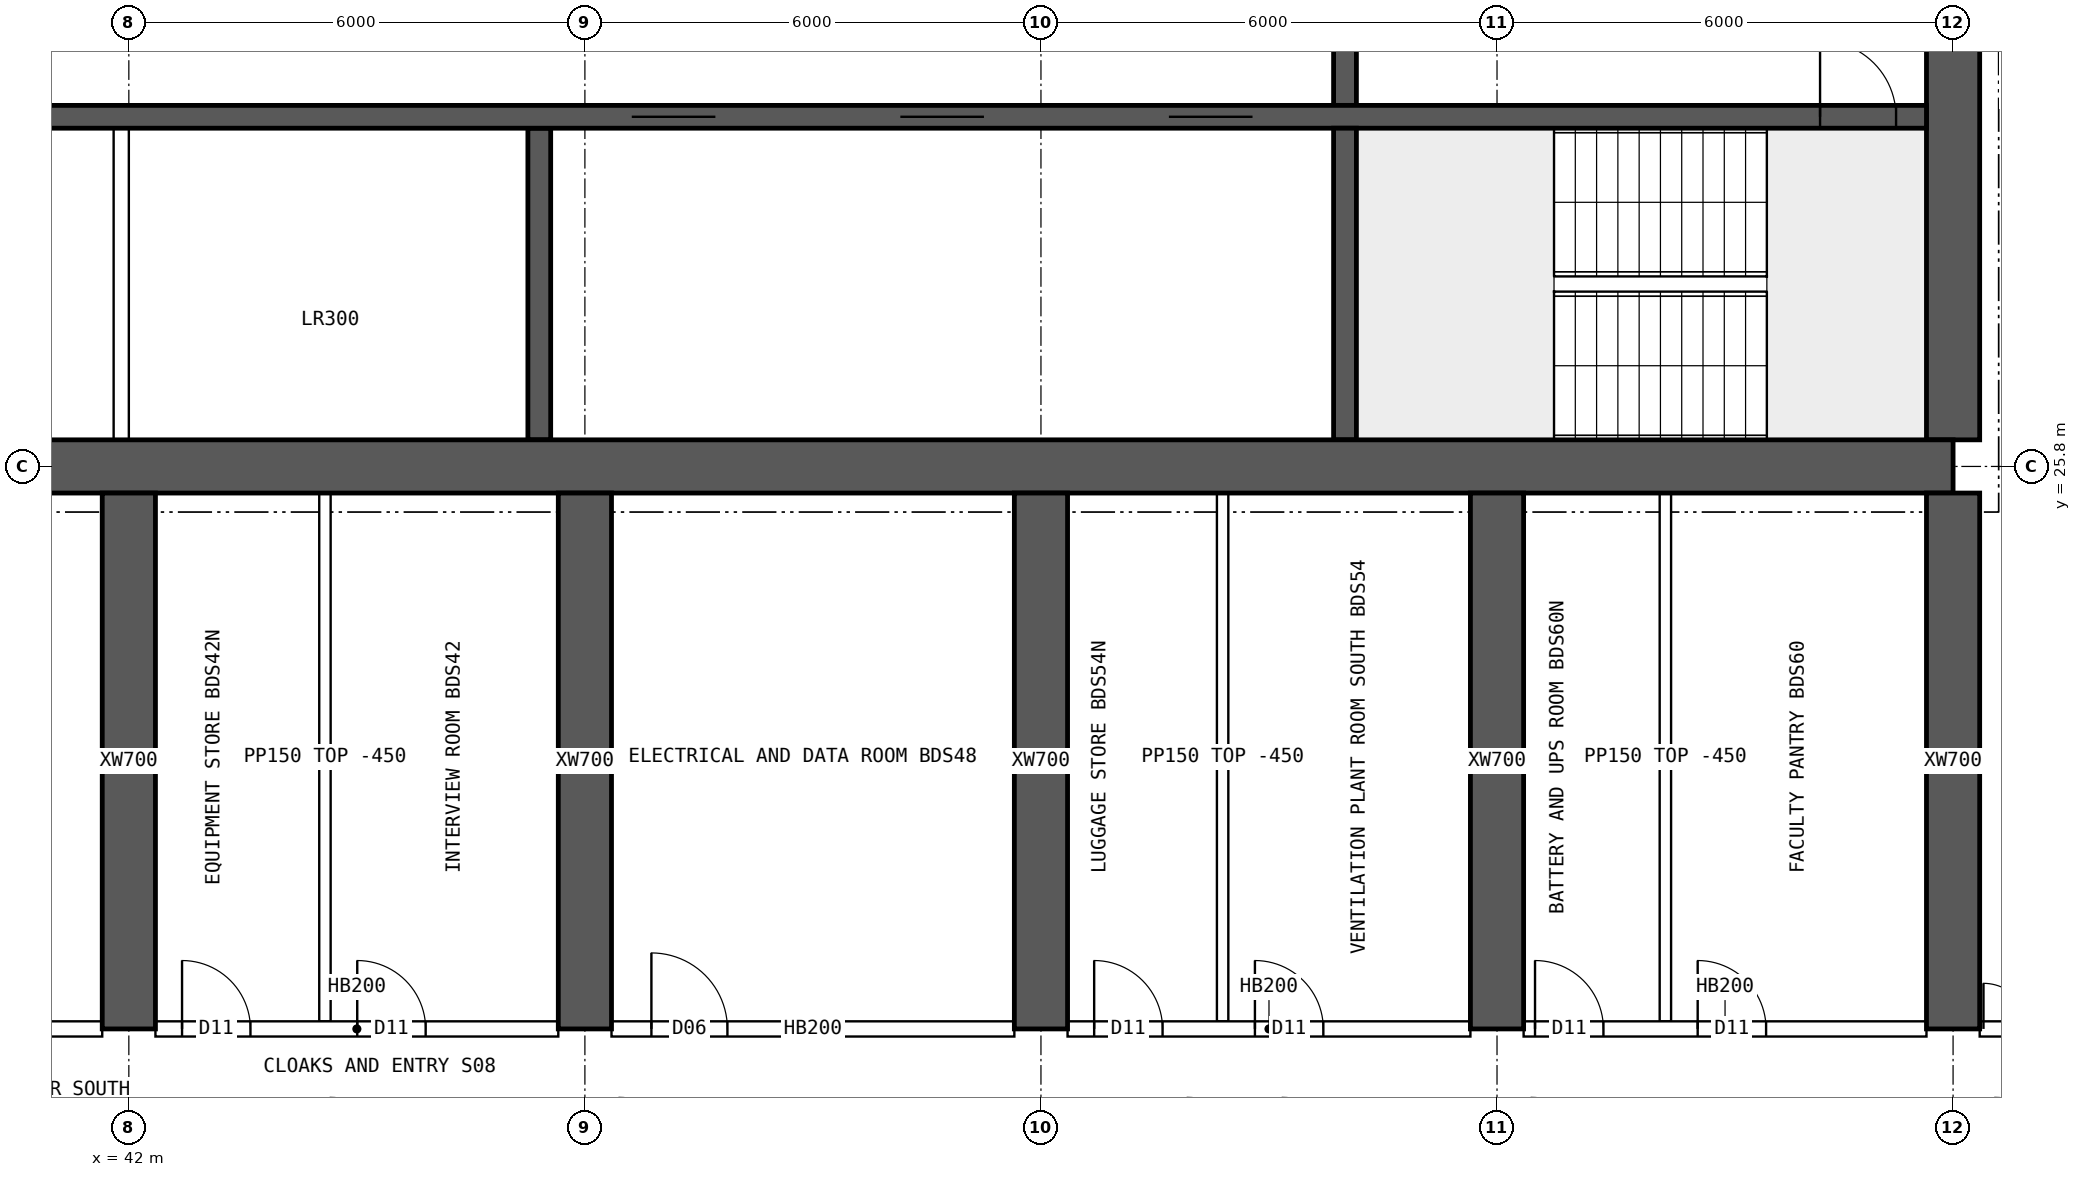
"""IFC4 building model, lengths in metres.
Left out: names, types, materials, properties, quantities, classifications, styles, units other than length and angle.
Written with IfcOpenShell. Run it as: python <this file> out.ifc"""

import sys

from ifc_helpers import new_model, si_unit, direction, frame, frame_2d, origin, place, context, subcontext, project, spatial, rectangle, extrude, element, fill, save


model = new_model("IFC4")
c1 = context("Model", 3, precision=1e-05, world=origin(), true_north=direction((0.0, 1.0)))
c2 = subcontext(c1, "Body", "Model", "MODEL_VIEW")
j1 = project(units=[si_unit("LENGTHUNIT", "METRE"), si_unit("PLANEANGLEUNIT", "RADIAN")], contexts=[c1])
p1 = place(None, origin())
s1 = spatial("IfcSite", under=j1, at=p1, CompositionType="ELEMENT")
p2 = place(p1, origin())
s2 = spatial("IfcBuilding", under=s1, at=p2, CompositionType="ELEMENT")
p3 = place(p2, frame((0.0, 0.0, 212.8)))
s3 = spatial("IfcBuildingStorey", under=s2, at=p3, CompositionType="ELEMENT", Elevation=212.8)
p4 = place(p3, frame((18.0, 25.8, 0.0), z_axis=(0.0, 0.0, 1.0), x_axis=(1.0, 0.0, 0.0)))
e1 = element("IfcWall", 1, at=p4, inside=s3, PredefinedType="SHEAR", context=c2, shape_type="SweptSolid", body=[
    extrude(rectangle(XDim=48.0, YDim=0.7, at=frame_2d((24.0, 0.0))), origin(), (0.0, 0.0, 1.0), 3.75),
])
p5 = place(p3, frame((66.0, 26.15, 0.0), z_axis=(0.0, 0.0, 1.0), x_axis=(0.0, 1.0, 0.0)))
e2 = element("IfcWall", 2, at=p5, inside=s3, PredefinedType="SHEAR", context=c2, shape_type="SweptSolid", body=[
    extrude(rectangle(XDim=11.7, YDim=0.7, at=frame_2d((5.85, 0.0))), origin(), (0.0, 0.0, 1.0), 3.75),
])
p6 = place(p5, frame((5.15, 0.0, 0.0)))
e3 = element("IfcOpeningElement", 3, at=p6, cuts=e2, PredefinedType="OPENING", context=c2, shape_type="SweptSolid", body=[
    extrude(rectangle(XDim=1.2, YDim=2.1, at=frame_2d((0.6, 1.05))), frame((0.0, 0.36, 0.0), z_axis=(0.0, -1.0, 0.0), x_axis=(1.0, 0.0, 0.0)), (0.0, 0.0, 1.0), 0.72),
])
p7 = place(p3, frame((18.35, 30.4, 0.0), z_axis=(0.0, 0.0, 1.0), x_axis=(1.0, 0.0, 0.0)))
e4 = element("IfcWall", 4, at=p7, inside=s3, PredefinedType="SHEAR", context=c2, shape_type="SweptSolid", body=[
    extrude(rectangle(XDim=47.3, YDim=0.3, at=frame_2d((23.65, 0.0))), origin(), (0.0, 0.0, 1.0), 3.75),
])
p8 = place(p7, frame((0.4, 0.0, 0.0)))
e5 = element("IfcOpeningElement", 5, at=p8, cuts=e4, PredefinedType="OPENING", context=c2, shape_type="SweptSolid", body=[
    extrude(rectangle(XDim=1.0, YDim=2.1, at=frame_2d((0.5, 1.05))), frame((0.0, 0.16, 0.0), z_axis=(0.0, -1.0, 0.0), x_axis=(1.0, 0.0, 0.0)), (0.0, 0.0, 1.0), 0.32),
])
p9 = place(p7, frame((45.9, 0.0, 0.0)))
e6 = element("IfcOpeningElement", 6, at=p9, cuts=e4, PredefinedType="OPENING", context=c2, shape_type="SweptSolid", body=[
    extrude(rectangle(XDim=1.0, YDim=2.1, at=frame_2d((0.5, 1.05))), frame((0.0, 0.16, 0.0), z_axis=(0.0, -1.0, 0.0), x_axis=(1.0, 0.0, 0.0)), (0.0, 0.0, 1.0), 0.32),
])
p10 = place(p7, frame((8.4, 0.0, 0.0)))
e7 = element("IfcOpeningElement", 7, at=p10, cuts=e4, PredefinedType="OPENING", context=c2, shape_type="SweptSolid", body=[
    extrude(rectangle(XDim=1.1, YDim=2.1, at=frame_2d((0.55, 1.05))), frame((0.0, 0.16, 0.0), z_axis=(0.0, -1.0, 0.0), x_axis=(1.0, 0.0, 0.0)), (0.0, 0.0, 1.0), 0.32),
])
p11 = place(p7, frame((11.0, 0.0, 0.0)))
e8 = element("IfcOpeningElement", 8, at=p11, cuts=e4, PredefinedType="OPENING", context=c2, shape_type="SweptSolid", body=[
    extrude(rectangle(XDim=1.1, YDim=2.1, at=frame_2d((0.55, 1.05))), frame((0.0, 0.16, 0.0), z_axis=(0.0, -1.0, 0.0), x_axis=(1.0, 0.0, 0.0)), (0.0, 0.0, 1.0), 0.32),
])
p12 = place(p7, frame((13.6, 0.0, 0.0)))
e9 = element("IfcOpeningElement", 9, at=p12, cuts=e4, PredefinedType="OPENING", context=c2, shape_type="SweptSolid", body=[
    extrude(rectangle(XDim=1.1, YDim=2.1, at=frame_2d((0.55, 1.05))), frame((0.0, 0.16, 0.0), z_axis=(0.0, -1.0, 0.0), x_axis=(1.0, 0.0, 0.0)), (0.0, 0.0, 1.0), 0.32),
])
p13 = place(p7, frame((16.2, 0.0, 0.0)))
e10 = element("IfcOpeningElement", 10, at=p13, cuts=e4, PredefinedType="OPENING", context=c2, shape_type="SweptSolid", body=[
    extrude(rectangle(XDim=1.1, YDim=2.1, at=frame_2d((0.55, 1.05))), frame((0.0, 0.16, 0.0), z_axis=(0.0, -1.0, 0.0), x_axis=(1.0, 0.0, 0.0)), (0.0, 0.0, 1.0), 0.32),
])
p14 = place(p7, frame((18.975, 0.0, 0.0)))
e11 = element("IfcOpeningElement", 11, at=p14, cuts=e4, PredefinedType="OPENING", context=c2, shape_type="SweptSolid", body=[
    extrude(rectangle(XDim=0.9, YDim=2.1, at=frame_2d((0.45, 1.05))), frame((0.0, 0.16, 0.0), z_axis=(0.0, -1.0, 0.0), x_axis=(1.0, 0.0, 0.0)), (0.0, 0.0, 1.0), 0.32),
])
p15 = place(p7, frame((30.267, 0.0, 0.0)))
e12 = element("IfcOpeningElement", 12, at=p15, cuts=e4, PredefinedType="OPENING", context=c2, shape_type="SweptSolid", body=[
    extrude(rectangle(XDim=1.1, YDim=2.1, at=frame_2d((0.55, 1.05))), frame((0.0, 0.16, 0.0), z_axis=(0.0, -1.0, 0.0), x_axis=(1.0, 0.0, 0.0)), (0.0, 0.0, 1.0), 0.32),
])
p16 = place(p7, frame((33.8, 0.0, 0.0)))
e13 = element("IfcOpeningElement", 13, at=p16, cuts=e4, PredefinedType="OPENING", context=c2, shape_type="SweptSolid", body=[
    extrude(rectangle(XDim=1.1, YDim=2.1, at=frame_2d((0.55, 1.05))), frame((0.0, 0.16, 0.0), z_axis=(0.0, -1.0, 0.0), x_axis=(1.0, 0.0, 0.0)), (0.0, 0.0, 1.0), 0.32),
])
p17 = place(p7, frame((37.333, 0.0, 0.0)))
e14 = element("IfcOpeningElement", 14, at=p17, cuts=e4, PredefinedType="OPENING", context=c2, shape_type="SweptSolid", body=[
    extrude(rectangle(XDim=1.1, YDim=2.1, at=frame_2d((0.55, 1.05))), frame((0.0, 0.16, 0.0), z_axis=(0.0, -1.0, 0.0), x_axis=(1.0, 0.0, 0.0)), (0.0, 0.0, 1.0), 0.32),
])
p18 = place(p3, frame((58.0, 26.15, 0.0), z_axis=(0.0, 0.0, 1.0), x_axis=(0.0, 1.0, 0.0)))
e15 = element("IfcWall", 15, at=p18, inside=s3, PredefinedType="SHEAR", context=c2, shape_type="SweptSolid", body=[
    extrude(rectangle(XDim=4.1, YDim=0.3, at=frame_2d((2.05, 0.0))), origin(), (0.0, 0.0, 1.0), 3.75),
])
p19 = place(p3, frame((58.0, 30.55, 0.0), z_axis=(0.0, 0.0, 1.0), x_axis=(0.0, 1.0, 0.0)))
e16 = element("IfcWall", 16, at=p19, inside=s3, PredefinedType="SHEAR", context=c2, shape_type="SweptSolid", body=[
    extrude(rectangle(XDim=3.9, YDim=0.3, at=frame_2d((1.95, 0.0))), origin(), (0.0, 0.0, 1.0), 3.75),
])
p20 = place(p19, frame((1.4, 0.0, 0.0)))
e17 = element("IfcOpeningElement", 17, at=p20, cuts=e16, PredefinedType="OPENING", context=c2, shape_type="SweptSolid", body=[
    extrude(rectangle(XDim=1.2, YDim=2.1, at=frame_2d((0.6, 1.05))), frame((0.0, 0.16, 0.0), z_axis=(0.0, -1.0, 0.0), x_axis=(1.0, 0.0, 0.0)), (0.0, 0.0, 1.0), 0.32),
])
p21 = place(p3, frame((47.4, 26.15, 0.0), z_axis=(0.0, 0.0, 1.0), x_axis=(0.0, 1.0, 0.0)))
e18 = element("IfcWall", 18, at=p21, inside=s3, PredefinedType="SHEAR", context=c2, shape_type="SweptSolid", body=[
    extrude(rectangle(XDim=4.1, YDim=0.3, at=frame_2d((2.05, 0.0))), origin(), (0.0, 0.0, 1.0), 3.75),
])
for number, where, z_axis, x_axis in (
    (19, (42.0, 18.4, 0.0), (0.0, 0.0, 1.0), (0.0, 1.0, 0.0)),
    (20, (48.0, 18.4, 0.0), (0.0, 0.0, 1.0), (0.0, 1.0, 0.0)),
    (21, (54.0, 18.4, 0.0), (0.0, 0.0, 1.0), (0.0, 1.0, 0.0)),
    (22, (60.0, 18.4, 0.0), (0.0, 0.0, 1.0), (0.0, 1.0, 0.0)),
    (23, (66.0, 18.4, 0.0), (0.0, 0.0, 1.0), (0.0, 1.0, 0.0)),
):
    element("IfcWall", number, at=place(p3, frame(where, z_axis=z_axis, x_axis=x_axis)), inside=s3, PredefinedType="SHEAR", context=c2, shape_type="SweptSolid", body=[
        extrude(rectangle(XDim=7.05, YDim=0.7, at=frame_2d((3.525, 0.0))), origin(), (0.0, 0.0, 1.0), 3.75),
    ])
p22 = place(p3, frame((41.9, 26.15, 0.0), z_axis=(0.0, 0.0, 1.0), x_axis=(0.0, 1.0, 0.0)))
e24 = element("IfcWall", 24, at=p22, inside=s3, PredefinedType="SOLIDWALL", context=c2, shape_type="SweptSolid", body=[
    extrude(rectangle(XDim=4.1, YDim=0.2, at=frame_2d((2.05, 0.0))), origin(), (0.0, 0.0, 1.0), 3.3),
])
p23 = place(p3, frame((36.35, 18.4, 0.0), z_axis=(0.0, 0.0, 1.0), x_axis=(1.0, 0.0, 0.0)))
e25 = element("IfcWall", 25, at=p23, inside=s3, PredefinedType="SOLIDWALL", context=c2, shape_type="SweptSolid", body=[
    extrude(rectangle(XDim=5.3, YDim=0.2, at=frame_2d((2.65, 0.0))), origin(), (0.0, 0.0, 1.0), 3.3),
])
p24 = place(p23, frame((0.525, 0.0, 0.0)))
e26 = element("IfcOpeningElement", 26, at=p24, cuts=e25, PredefinedType="OPENING", context=c2, shape_type="SweptSolid", body=[
    extrude(rectangle(XDim=1.0, YDim=2.1, at=frame_2d((0.5, 1.05))), frame((0.0, 0.11, 0.0), z_axis=(0.0, -1.0, 0.0), x_axis=(1.0, 0.0, 0.0)), (0.0, 0.0, 1.0), 0.22),
])
p25 = place(p3, frame((42.35, 18.4, 0.0), z_axis=(0.0, 0.0, 1.0), x_axis=(1.0, 0.0, 0.0)))
e27 = element("IfcWall", 27, at=p25, inside=s3, PredefinedType="SOLIDWALL", context=c2, shape_type="SweptSolid", body=[
    extrude(rectangle(XDim=5.3, YDim=0.2, at=frame_2d((2.65, 0.0))), origin(), (0.0, 0.0, 1.0), 3.3),
])
p26 = place(p25, frame((0.35, 0.0, 0.0)))
e28 = element("IfcOpeningElement", 28, at=p26, cuts=e27, PredefinedType="OPENING", context=c2, shape_type="SweptSolid", body=[
    extrude(rectangle(XDim=0.9, YDim=2.1, at=frame_2d((0.45, 1.05))), frame((0.0, 0.11, 0.0), z_axis=(0.0, -1.0, 0.0), x_axis=(1.0, 0.0, 0.0)), (0.0, 0.0, 1.0), 0.22),
])
p27 = place(p25, frame((2.655, 0.0, 0.0)))
e29 = element("IfcOpeningElement", 29, at=p27, cuts=e27, PredefinedType="OPENING", context=c2, shape_type="SweptSolid", body=[
    extrude(rectangle(XDim=0.9, YDim=2.1, at=frame_2d((0.45, 1.05))), frame((0.0, 0.11, 0.0), z_axis=(0.0, -1.0, 0.0), x_axis=(1.0, 0.0, 0.0)), (0.0, 0.0, 1.0), 0.22),
])
p28 = place(p3, frame((48.35, 18.4, 0.0), z_axis=(0.0, 0.0, 1.0), x_axis=(1.0, 0.0, 0.0)))
e30 = element("IfcWall", 30, at=p28, inside=s3, PredefinedType="SOLIDWALL", context=c2, shape_type="SweptSolid", body=[
    extrude(rectangle(XDim=5.3, YDim=0.2, at=frame_2d((2.65, 0.0))), origin(), (0.0, 0.0, 1.0), 3.3),
])
p29 = place(p28, frame((0.525, 0.0, 0.0)))
e31 = element("IfcOpeningElement", 31, at=p29, cuts=e30, PredefinedType="OPENING", context=c2, shape_type="SweptSolid", body=[
    extrude(rectangle(XDim=1.0, YDim=2.1, at=frame_2d((0.5, 1.05))), frame((0.0, 0.11, 0.0), z_axis=(0.0, -1.0, 0.0), x_axis=(1.0, 0.0, 0.0)), (0.0, 0.0, 1.0), 0.22),
])
p30 = place(p3, frame((54.35, 18.4, 0.0), z_axis=(0.0, 0.0, 1.0), x_axis=(1.0, 0.0, 0.0)))
e32 = element("IfcWall", 32, at=p30, inside=s3, PredefinedType="SOLIDWALL", context=c2, shape_type="SweptSolid", body=[
    extrude(rectangle(XDim=5.3, YDim=0.2, at=frame_2d((2.65, 0.0))), origin(), (0.0, 0.0, 1.0), 3.3),
])
p31 = place(p30, frame((0.35, 0.0, 0.0)))
e33 = element("IfcOpeningElement", 33, at=p31, cuts=e32, PredefinedType="OPENING", context=c2, shape_type="SweptSolid", body=[
    extrude(rectangle(XDim=0.9, YDim=2.1, at=frame_2d((0.45, 1.05))), frame((0.0, 0.11, 0.0), z_axis=(0.0, -1.0, 0.0), x_axis=(1.0, 0.0, 0.0)), (0.0, 0.0, 1.0), 0.22),
])
p32 = place(p30, frame((2.465, 0.0, 0.0)))
e34 = element("IfcOpeningElement", 34, at=p32, cuts=e32, PredefinedType="OPENING", context=c2, shape_type="SweptSolid", body=[
    extrude(rectangle(XDim=0.9, YDim=2.1, at=frame_2d((0.45, 1.05))), frame((0.0, 0.11, 0.0), z_axis=(0.0, -1.0, 0.0), x_axis=(1.0, 0.0, 0.0)), (0.0, 0.0, 1.0), 0.22),
])
p33 = place(p3, frame((60.35, 18.4, 0.0), z_axis=(0.0, 0.0, 1.0), x_axis=(1.0, 0.0, 0.0)))
e35 = element("IfcWall", 35, at=p33, inside=s3, PredefinedType="SOLIDWALL", context=c2, shape_type="SweptSolid", body=[
    extrude(rectangle(XDim=5.3, YDim=0.2, at=frame_2d((2.65, 0.0))), origin(), (0.0, 0.0, 1.0), 3.3),
])
p34 = place(p33, frame((0.15, 0.0, 0.0)))
e36 = element("IfcOpeningElement", 36, at=p34, cuts=e35, PredefinedType="OPENING", context=c2, shape_type="SweptSolid", body=[
    extrude(rectangle(XDim=0.9, YDim=2.1, at=frame_2d((0.45, 1.05))), frame((0.0, 0.11, 0.0), z_axis=(0.0, -1.0, 0.0), x_axis=(1.0, 0.0, 0.0)), (0.0, 0.0, 1.0), 0.22),
])
p35 = place(p33, frame((2.29, 0.0, 0.0)))
e37 = element("IfcOpeningElement", 37, at=p35, cuts=e35, PredefinedType="OPENING", context=c2, shape_type="SweptSolid", body=[
    extrude(rectangle(XDim=0.9, YDim=2.1, at=frame_2d((0.45, 1.05))), frame((0.0, 0.11, 0.0), z_axis=(0.0, -1.0, 0.0), x_axis=(1.0, 0.0, 0.0)), (0.0, 0.0, 1.0), 0.22),
])
p36 = place(p3, frame((66.35, 18.4, 0.0), z_axis=(0.0, 0.0, 1.0), x_axis=(1.0, 0.0, 0.0)))
e38 = element("IfcWall", 38, at=p36, inside=s3, PredefinedType="SOLIDWALL", context=c2, shape_type="SweptSolid", body=[
    extrude(rectangle(XDim=2.05, YDim=0.2, at=frame_2d((1.025, 0.0))), origin(), (0.0, 0.0, 1.0), 3.3),
])
p37 = place(p36, frame((0.05, 0.0, 0.0)))
e39 = element("IfcOpeningElement", 39, at=p37, cuts=e38, PredefinedType="OPENING", context=c2, shape_type="SweptSolid", body=[
    extrude(rectangle(XDim=1.2, YDim=2.1, at=frame_2d((0.6, 1.05))), frame((0.0, 0.11, 0.0), z_axis=(0.0, -1.0, 0.0), x_axis=(1.0, 0.0, 0.0)), (0.0, 0.0, 1.0), 0.22),
])
for number, where, z_axis, x_axis in (
    (40, (44.58, 18.5, 0.0), (0.0, 0.0, 1.0), (0.0, 1.0, 0.0)),
    (41, (56.39, 18.5, 0.0), (0.0, 0.0, 1.0), (0.0, 1.0, 0.0)),
    (42, (62.215, 18.5, 0.0), (0.0, 0.0, 1.0), (0.0, 1.0, 0.0)),
):
    element("IfcWall", number, at=place(p3, frame(where, z_axis=z_axis, x_axis=x_axis)), inside=s3, PredefinedType="PARTITIONING", context=c2, shape_type="SweptSolid", body=[
        extrude(rectangle(XDim=6.95, YDim=0.15, at=frame_2d((3.475, 0.0))), origin(), (0.0, 0.0, 1.0), 3.3),
    ])
p38 = place(p9, origin())
e43 = element("IfcDoor", 43, at=p38, inside=s3, OperationType="SINGLE_SWING_LEFT", PredefinedType="DOOR", context=c2, shape_type="SweptSolid", body=[
    extrude(rectangle(XDim=1.0, YDim=2.1, at=frame_2d((0.5, 1.05))), frame((0.0, 0.025, 0.0), z_axis=(0.0, -1.0, 0.0), x_axis=(1.0, 0.0, 0.0)), (0.0, 0.0, 1.0), 0.05),
])
fill(e6, e43)
p39 = place(p15, origin())
e44 = element("IfcDoor", 44, at=p39, inside=s3, OperationType="DOUBLE_DOOR_SLIDING", PredefinedType="DOOR", context=c2, shape_type="SweptSolid", body=[
    extrude(rectangle(XDim=1.1, YDim=2.1, at=frame_2d((0.55, 1.05))), frame((0.0, 0.025, 0.0), z_axis=(0.0, -1.0, 0.0), x_axis=(1.0, 0.0, 0.0)), (0.0, 0.0, 1.0), 0.05),
])
fill(e12, e44)
p40 = place(p16, origin())
e45 = element("IfcDoor", 45, at=p40, inside=s3, OperationType="DOUBLE_DOOR_SLIDING", PredefinedType="DOOR", context=c2, shape_type="SweptSolid", body=[
    extrude(rectangle(XDim=1.1, YDim=2.1, at=frame_2d((0.55, 1.05))), frame((0.0, 0.025, 0.0), z_axis=(0.0, -1.0, 0.0), x_axis=(1.0, 0.0, 0.0)), (0.0, 0.0, 1.0), 0.05),
])
fill(e13, e45)
p41 = place(p17, origin())
e46 = element("IfcDoor", 46, at=p41, inside=s3, OperationType="DOUBLE_DOOR_SLIDING", PredefinedType="DOOR", context=c2, shape_type="SweptSolid", body=[
    extrude(rectangle(XDim=1.1, YDim=2.1, at=frame_2d((0.55, 1.05))), frame((0.0, 0.025, 0.0), z_axis=(0.0, -1.0, 0.0), x_axis=(1.0, 0.0, 0.0)), (0.0, 0.0, 1.0), 0.05),
])
fill(e14, e46)
p42 = place(p37, origin())
e47 = element("IfcDoor", 47, at=p42, inside=s3, OperationType="DOUBLE_DOOR_SINGLE_SWING", PredefinedType="DOOR", context=c2, shape_type="SweptSolid", body=[
    extrude(rectangle(XDim=1.2, YDim=2.1, at=frame_2d((0.6, 1.05))), frame((0.0, 0.025, 0.0), z_axis=(0.0, -1.0, 0.0), x_axis=(1.0, 0.0, 0.0)), (0.0, 0.0, 1.0), 0.05),
])
fill(e39, e47)
p43 = place(p26, origin())
e48 = element("IfcDoor", 48, at=p43, inside=s3, OperationType="SINGLE_SWING_LEFT", PredefinedType="DOOR", context=c2, shape_type="SweptSolid", body=[
    extrude(rectangle(XDim=0.9, YDim=2.1, at=frame_2d((0.45, 1.05))), frame((0.0, 0.025, 0.0), z_axis=(0.0, -1.0, 0.0), x_axis=(1.0, 0.0, 0.0)), (0.0, 0.0, 1.0), 0.05),
])
fill(e28, e48)
p44 = place(p27, origin())
e49 = element("IfcDoor", 49, at=p44, inside=s3, OperationType="SINGLE_SWING_LEFT", PredefinedType="DOOR", context=c2, shape_type="SweptSolid", body=[
    extrude(rectangle(XDim=0.9, YDim=2.1, at=frame_2d((0.45, 1.05))), frame((0.0, 0.025, 0.0), z_axis=(0.0, -1.0, 0.0), x_axis=(1.0, 0.0, 0.0)), (0.0, 0.0, 1.0), 0.05),
])
fill(e29, e49)
p45 = place(p29, origin())
e50 = element("IfcDoor", 50, at=p45, inside=s3, OperationType="SINGLE_SWING_LEFT", PredefinedType="DOOR", context=c2, shape_type="SweptSolid", body=[
    extrude(rectangle(XDim=1.0, YDim=2.1, at=frame_2d((0.5, 1.05))), frame((0.0, 0.025, 0.0), z_axis=(0.0, -1.0, 0.0), x_axis=(1.0, 0.0, 0.0)), (0.0, 0.0, 1.0), 0.05),
])
fill(e31, e50)
p46 = place(p31, origin())
e51 = element("IfcDoor", 51, at=p46, inside=s3, OperationType="SINGLE_SWING_LEFT", PredefinedType="DOOR", context=c2, shape_type="SweptSolid", body=[
    extrude(rectangle(XDim=0.9, YDim=2.1, at=frame_2d((0.45, 1.05))), frame((0.0, 0.025, 0.0), z_axis=(0.0, -1.0, 0.0), x_axis=(1.0, 0.0, 0.0)), (0.0, 0.0, 1.0), 0.05),
])
fill(e33, e51)
p47 = place(p32, origin())
e52 = element("IfcDoor", 52, at=p47, inside=s3, OperationType="SINGLE_SWING_LEFT", PredefinedType="DOOR", context=c2, shape_type="SweptSolid", body=[
    extrude(rectangle(XDim=0.9, YDim=2.1, at=frame_2d((0.45, 1.05))), frame((0.0, 0.025, 0.0), z_axis=(0.0, -1.0, 0.0), x_axis=(1.0, 0.0, 0.0)), (0.0, 0.0, 1.0), 0.05),
])
fill(e34, e52)
p48 = place(p34, origin())
e53 = element("IfcDoor", 53, at=p48, inside=s3, OperationType="SINGLE_SWING_LEFT", PredefinedType="DOOR", context=c2, shape_type="SweptSolid", body=[
    extrude(rectangle(XDim=0.9, YDim=2.1, at=frame_2d((0.45, 1.05))), frame((0.0, 0.025, 0.0), z_axis=(0.0, -1.0, 0.0), x_axis=(1.0, 0.0, 0.0)), (0.0, 0.0, 1.0), 0.05),
])
fill(e36, e53)
p49 = place(p35, origin())
e54 = element("IfcDoor", 54, at=p49, inside=s3, OperationType="SINGLE_SWING_LEFT", PredefinedType="DOOR", context=c2, shape_type="SweptSolid", body=[
    extrude(rectangle(XDim=0.9, YDim=2.1, at=frame_2d((0.45, 1.05))), frame((0.0, 0.025, 0.0), z_axis=(0.0, -1.0, 0.0), x_axis=(1.0, 0.0, 0.0)), (0.0, 0.0, 1.0), 0.05),
])
fill(e37, e54)
save(model, sys.argv[1])
